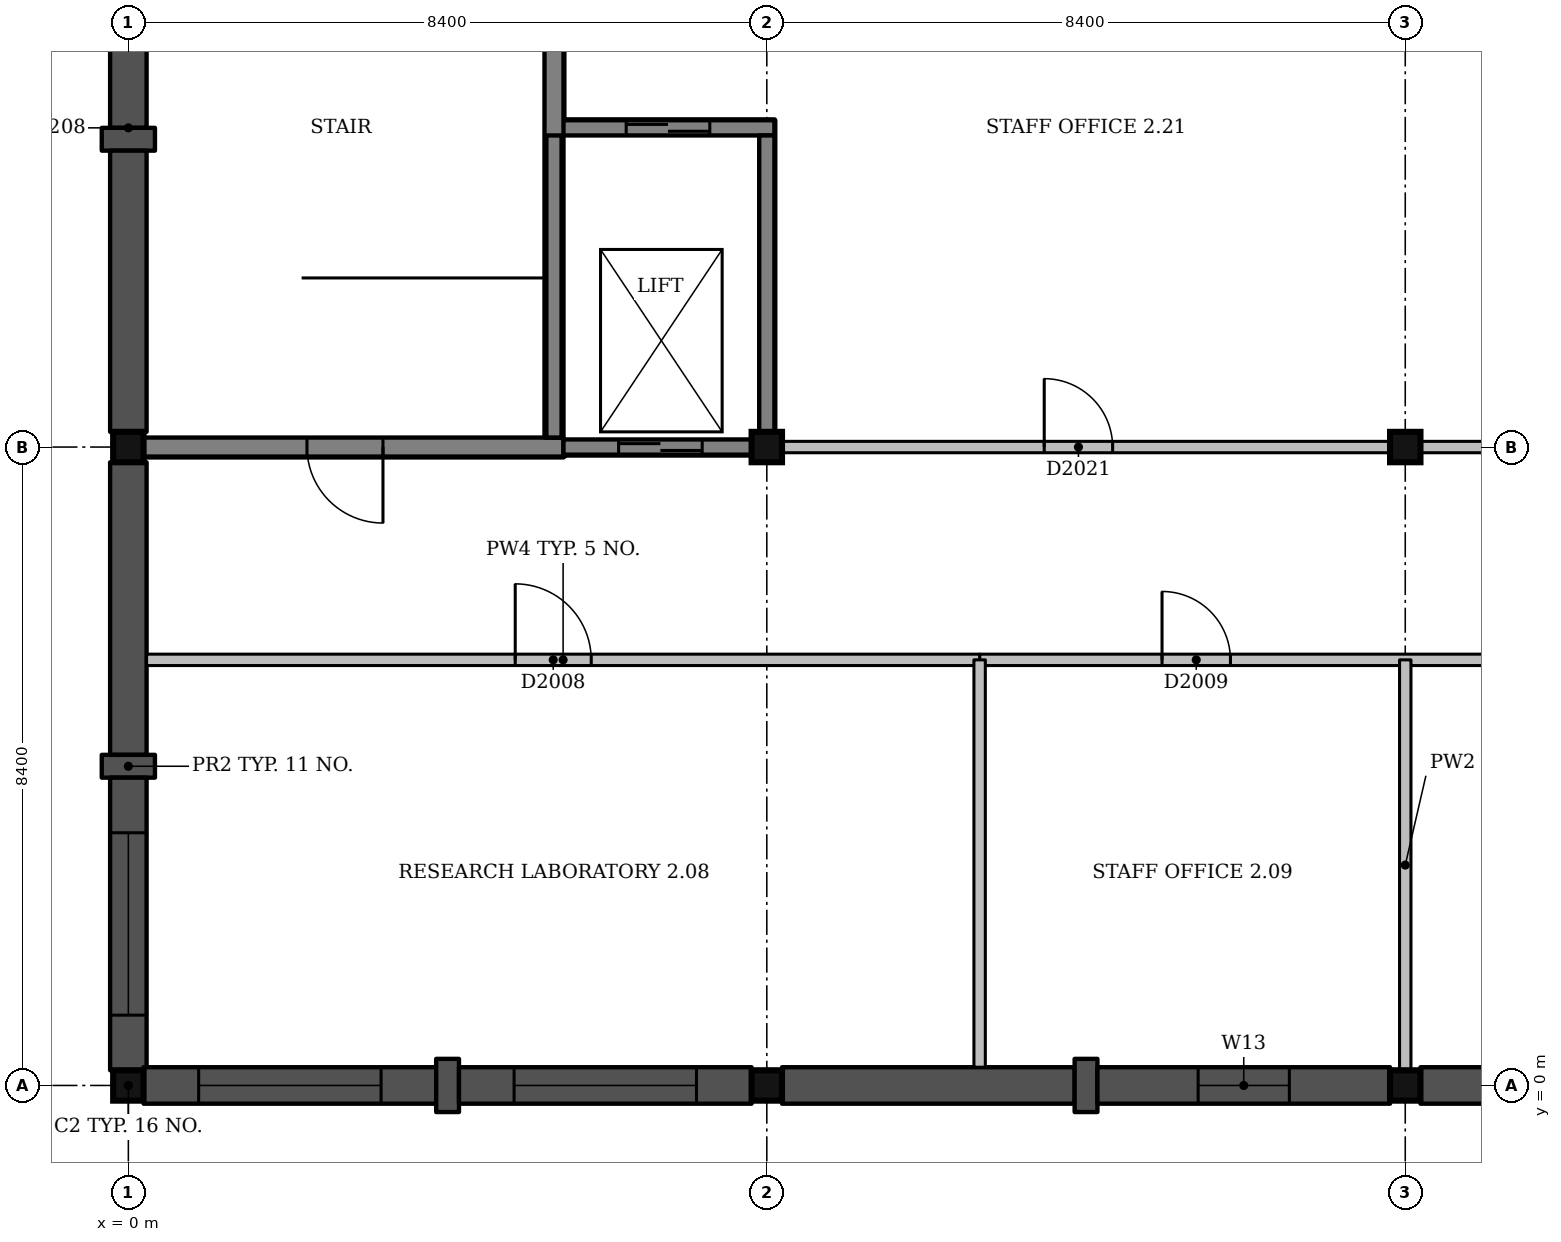
"""IFC4 building model, lengths in metres.
Left out: names, types, materials, properties, quantities, classifications, styles, units other than length and angle.
Written with IfcOpenShell. Run it as: python <this file> out.ifc"""

import sys

from ifc_helpers import new_model, si_unit, direction, frame, frame_2d, origin, origin_2d, place, context, subcontext, project, spatial, rectangle, extrude, element, fill, save


model = new_model("IFC4")
c1 = context("Model", 3, precision=1e-05, world=origin(), true_north=direction((0.0, 1.0)))
c2 = subcontext(c1, "Body", "Model", "MODEL_VIEW")
j1 = project(units=[si_unit("LENGTHUNIT", "METRE"), si_unit("PLANEANGLEUNIT", "RADIAN")], contexts=[c1])
p1 = place(None, origin())
s1 = spatial("IfcSite", under=j1, at=p1, CompositionType="ELEMENT")
p2 = place(p1, origin())
s2 = spatial("IfcBuilding", under=s1, at=p2, CompositionType="ELEMENT")
p3 = place(p2, frame((0.0, 0.0, 9.0)))
s3 = spatial("IfcBuildingStorey", under=s2, at=p3, CompositionType="ELEMENT", Elevation=9.0)
for number, where, z_axis, x_axis in (
    (1, (0.0, 0.0, 0.0), (0.0, 0.0, 1.0), (1.0, 0.0, 0.0)),
    (2, (0.0, 8.4, 0.0), (0.0, 0.0, 1.0), (1.0, 0.0, 0.0)),
    (3, (8.4, 0.0, 0.0), (0.0, 0.0, 1.0), (1.0, 0.0, 0.0)),
    (4, (8.4, 8.4, 0.0), (0.0, 0.0, 1.0), (1.0, 0.0, 0.0)),
    (5, (16.8, 0.0, 0.0), (0.0, 0.0, 1.0), (1.0, 0.0, 0.0)),
    (6, (16.8, 8.4, 0.0), (0.0, 0.0, 1.0), (1.0, 0.0, 0.0)),
):
    element("IfcColumn", number, at=place(p3, frame(where, z_axis=z_axis, x_axis=x_axis)), inside=s3, PredefinedType="COLUMN", context=c2, shape_type="SweptSolid", body=[
        extrude(rectangle(XDim=0.4, YDim=0.4, at=origin_2d()), origin(), (0.0, 0.0, 1.0), 4.5),
    ])
p4 = place(p3, frame((5.5, 12.6, 0.0), z_axis=(0.0, 0.0, 1.0), x_axis=(1.0, 0.0, 0.0)))
e7 = element("IfcWall", 7, at=p4, inside=s3, PredefinedType="SHEAR", context=c2, shape_type="SweptSolid", body=[
    extrude(rectangle(XDim=3.0, YDim=0.2, at=frame_2d((1.5, 0.0))), origin(), (0.0, 0.0, 1.0), 4.5),
])
p5 = place(p4, frame((1.05, 0.0, 0.0)))
e8 = element("IfcOpeningElement", 8, at=p5, cuts=e7, PredefinedType="OPENING", context=c2, shape_type="SweptSolid", body=[
    extrude(rectangle(XDim=1.1, YDim=2.1, at=frame_2d((0.55, 1.05))), frame((0.0, 0.11, 0.0), z_axis=(0.0, -1.0, 0.0), x_axis=(1.0, 0.0, 0.0)), (0.0, 0.0, 1.0), 0.22),
])
p6 = place(p3, frame((8.4, 8.6, 0.0), z_axis=(0.0, 0.0, 1.0), x_axis=(0.0, 1.0, 0.0)))
e9 = element("IfcWall", 9, at=p6, inside=s3, PredefinedType="SHEAR", context=c2, shape_type="SweptSolid", body=[
    extrude(rectangle(XDim=3.9, YDim=0.2, at=frame_2d((1.95, 0.0))), origin(), (0.0, 0.0, 1.0), 4.5),
])
p7 = place(p3, frame((0.2, 8.4, 0.0), z_axis=(0.0, 0.0, 1.0), x_axis=(1.0, 0.0, 0.0)))
e10 = element("IfcWall", 10, at=p7, inside=s3, PredefinedType="SHEAR", context=c2, shape_type="SweptSolid", body=[
    extrude(rectangle(XDim=5.525, YDim=0.25, at=frame_2d((2.763, 0.0))), origin(), (0.0, 0.0, 1.0), 4.2),
])
p8 = place(p7, frame((2.15, 0.0, 0.0)))
e11 = element("IfcOpeningElement", 11, at=p8, cuts=e10, PredefinedType="OPENING", context=c2, shape_type="SweptSolid", body=[
    extrude(rectangle(XDim=1.0, YDim=2.1, at=frame_2d((0.5, 1.05))), frame((0.0, 0.135, 0.0), z_axis=(0.0, -1.0, 0.0), x_axis=(1.0, 0.0, 0.0)), (0.0, 0.0, 1.0), 0.27),
])
p9 = place(p3, frame((5.6, 8.525, 0.0), z_axis=(0.0, 0.0, 1.0), x_axis=(0.0, 1.0, 0.0)))
e12 = element("IfcWall", 12, at=p9, inside=s3, PredefinedType="SHEAR", context=c2, shape_type="SweptSolid", body=[
    extrude(rectangle(XDim=8.15, YDim=0.25, at=frame_2d((4.075, 0.0))), origin(), (0.0, 0.0, 1.0), 4.2),
])
p10 = place(p3, frame((0.0, 16.3, 0.0), z_axis=(0.0, 0.0, 1.0), x_axis=(0.0, -1.0, 0.0)))
e13 = element("IfcWall", 13, at=p10, inside=s3, PredefinedType="SOLIDWALL", context=c2, shape_type="SweptSolid", body=[
    extrude(rectangle(XDim=3.7, YDim=0.48, at=frame_2d((1.85, 0.0))), origin(), (0.0, 0.0, 1.0), 4.2),
])
p11 = place(p3, frame((0.0, 12.6, 0.0), z_axis=(0.0, 0.0, 1.0), x_axis=(0.0, -1.0, 0.0)))
e14 = element("IfcWall", 14, at=p11, inside=s3, PredefinedType="SOLIDWALL", context=c2, shape_type="SweptSolid", body=[
    extrude(rectangle(XDim=0.3, YDim=0.7, at=frame_2d((0.15, 0.0))), origin(), (0.0, 0.0, 1.0), 4.2),
])
p12 = place(p3, frame((0.0, 12.3, 0.0), z_axis=(0.0, 0.0, 1.0), x_axis=(0.0, -1.0, 0.0)))
e15 = element("IfcWall", 15, at=p12, inside=s3, PredefinedType="SOLIDWALL", context=c2, shape_type="SweptSolid", body=[
    extrude(rectangle(XDim=3.7, YDim=0.48, at=frame_2d((1.85, 0.0))), origin(), (0.0, 0.0, 1.0), 4.2),
])
p13 = place(p3, frame((0.0, 8.2, 0.0), z_axis=(0.0, 0.0, 1.0), x_axis=(0.0, -1.0, 0.0)))
e16 = element("IfcWall", 16, at=p13, inside=s3, PredefinedType="SOLIDWALL", context=c2, shape_type="SweptSolid", body=[
    extrude(rectangle(XDim=3.85, YDim=0.48, at=frame_2d((1.925, 0.0))), origin(), (0.0, 0.0, 1.0), 3.6),
])
p14 = place(p3, frame((0.0, 4.35, 0.0), z_axis=(0.0, 0.0, 1.0), x_axis=(0.0, -1.0, 0.0)))
e17 = element("IfcWall", 17, at=p14, inside=s3, PredefinedType="SOLIDWALL", context=c2, shape_type="SweptSolid", body=[
    extrude(rectangle(XDim=0.3, YDim=0.7, at=frame_2d((0.15, 0.0))), origin(), (0.0, 0.0, 1.0), 3.6),
])
p15 = place(p3, frame((0.0, 4.05, 0.0), z_axis=(0.0, 0.0, 1.0), x_axis=(0.0, -1.0, 0.0)))
e18 = element("IfcWall", 18, at=p15, inside=s3, PredefinedType="SOLIDWALL", context=c2, shape_type="SweptSolid", body=[
    extrude(rectangle(XDim=3.85, YDim=0.48, at=frame_2d((1.925, 0.0))), origin(), (0.0, 0.0, 1.0), 3.6),
])
p16 = place(p15, frame((0.725, 0.0, 2.4)))
e19 = element("IfcOpeningElement", 19, at=p16, cuts=e18, PredefinedType="OPENING", context=c2, shape_type="SweptSolid", body=[
    extrude(rectangle(XDim=2.4, YDim=0.6, at=frame_2d((1.2, 0.3))), frame((0.0, 0.25, 0.0), z_axis=(0.0, -1.0, 0.0), x_axis=(1.0, 0.0, 0.0)), (0.0, 0.0, 1.0), 0.5),
])
p17 = place(p3, frame((0.2, 0.0, 0.0), z_axis=(0.0, 0.0, 1.0), x_axis=(1.0, 0.0, 0.0)))
e20 = element("IfcWall", 20, at=p17, inside=s3, PredefinedType="SOLIDWALL", context=c2, shape_type="SweptSolid", body=[
    extrude(rectangle(XDim=3.85, YDim=0.48, at=frame_2d((1.925, 0.0))), origin(), (0.0, 0.0, 1.0), 3.6),
])
p18 = place(p17, frame((0.725, 0.0, 2.4)))
e21 = element("IfcOpeningElement", 21, at=p18, cuts=e20, PredefinedType="OPENING", context=c2, shape_type="SweptSolid", body=[
    extrude(rectangle(XDim=2.4, YDim=0.6, at=frame_2d((1.2, 0.3))), frame((0.0, 0.25, 0.0), z_axis=(0.0, -1.0, 0.0), x_axis=(1.0, 0.0, 0.0)), (0.0, 0.0, 1.0), 0.5),
])
p19 = place(p3, frame((4.05, 0.0, 0.0), z_axis=(0.0, 0.0, 1.0), x_axis=(1.0, 0.0, 0.0)))
e22 = element("IfcWall", 22, at=p19, inside=s3, PredefinedType="SOLIDWALL", context=c2, shape_type="SweptSolid", body=[
    extrude(rectangle(XDim=0.3, YDim=0.7, at=frame_2d((0.15, 0.0))), origin(), (0.0, 0.0, 1.0), 3.6),
])
p20 = place(p3, frame((4.35, 0.0, 0.0), z_axis=(0.0, 0.0, 1.0), x_axis=(1.0, 0.0, 0.0)))
e23 = element("IfcWall", 23, at=p20, inside=s3, PredefinedType="SOLIDWALL", context=c2, shape_type="SweptSolid", body=[
    extrude(rectangle(XDim=3.85, YDim=0.48, at=frame_2d((1.925, 0.0))), origin(), (0.0, 0.0, 1.0), 3.6),
])
p21 = place(p20, frame((0.725, 0.0, 2.4)))
e24 = element("IfcOpeningElement", 24, at=p21, cuts=e23, PredefinedType="OPENING", context=c2, shape_type="SweptSolid", body=[
    extrude(rectangle(XDim=2.4, YDim=0.6, at=frame_2d((1.2, 0.3))), frame((0.0, 0.25, 0.0), z_axis=(0.0, -1.0, 0.0), x_axis=(1.0, 0.0, 0.0)), (0.0, 0.0, 1.0), 0.5),
])
p22 = place(p3, frame((8.6, 0.0, 0.0), z_axis=(0.0, 0.0, 1.0), x_axis=(1.0, 0.0, 0.0)))
e25 = element("IfcWall", 25, at=p22, inside=s3, PredefinedType="SOLIDWALL", context=c2, shape_type="SweptSolid", body=[
    extrude(rectangle(XDim=3.85, YDim=0.48, at=frame_2d((1.925, 0.0))), origin(), (0.0, 0.0, 1.0), 3.6),
])
p23 = place(p3, frame((12.45, 0.0, 0.0), z_axis=(0.0, 0.0, 1.0), x_axis=(1.0, 0.0, 0.0)))
e26 = element("IfcWall", 26, at=p23, inside=s3, PredefinedType="SOLIDWALL", context=c2, shape_type="SweptSolid", body=[
    extrude(rectangle(XDim=0.3, YDim=0.7, at=frame_2d((0.15, 0.0))), origin(), (0.0, 0.0, 1.0), 3.6),
])
p24 = place(p3, frame((12.75, 0.0, 0.0), z_axis=(0.0, 0.0, 1.0), x_axis=(1.0, 0.0, 0.0)))
e27 = element("IfcWall", 27, at=p24, inside=s3, PredefinedType="SOLIDWALL", context=c2, shape_type="SweptSolid", body=[
    extrude(rectangle(XDim=3.85, YDim=0.48, at=frame_2d((1.925, 0.0))), origin(), (0.0, 0.0, 1.0), 3.6),
])
p25 = place(p24, frame((1.325, 0.0, 0.9)))
e28 = element("IfcOpeningElement", 28, at=p25, cuts=e27, PredefinedType="OPENING", context=c2, shape_type="SweptSolid", body=[
    extrude(rectangle(XDim=1.2, YDim=2.1, at=frame_2d((0.6, 1.05))), frame((0.0, 0.25, 0.0), z_axis=(0.0, -1.0, 0.0), x_axis=(1.0, 0.0, 0.0)), (0.0, 0.0, 1.0), 0.5),
])
p26 = place(p3, frame((17.0, 0.0, 0.0), z_axis=(0.0, 0.0, 1.0), x_axis=(1.0, 0.0, 0.0)))
e29 = element("IfcWall", 29, at=p26, inside=s3, PredefinedType="SOLIDWALL", context=c2, shape_type="SweptSolid", body=[
    extrude(rectangle(XDim=3.85, YDim=0.48, at=frame_2d((1.925, 0.0))), origin(), (0.0, 0.0, 1.0), 3.6),
])
p27 = place(p26, frame((1.325, 0.0, 0.9)))
e30 = element("IfcOpeningElement", 30, at=p27, cuts=e29, PredefinedType="OPENING", context=c2, shape_type="SweptSolid", body=[
    extrude(rectangle(XDim=1.2, YDim=2.1, at=frame_2d((0.6, 1.05))), frame((0.0, 0.25, 0.0), z_axis=(0.0, -1.0, 0.0), x_axis=(1.0, 0.0, 0.0)), (0.0, 0.0, 1.0), 0.5),
])
p28 = place(p3, frame((11.2, 5.6, 0.0), z_axis=(0.0, 0.0, 1.0), x_axis=(1.0, 0.0, 0.0)))
e31 = element("IfcWall", 31, at=p28, inside=s3, PredefinedType="PARTITIONING", context=c2, shape_type="SweptSolid", body=[
    extrude(rectangle(XDim=30.0, YDim=0.15, at=frame_2d((15.0, 0.0))), origin(), (0.0, 0.0, 1.0), 3.6),
])
p29 = place(p28, frame((2.4, 0.0, 0.0)))
e32 = element("IfcOpeningElement", 32, at=p29, cuts=e31, PredefinedType="OPENING", context=c2, shape_type="SweptSolid", body=[
    extrude(rectangle(XDim=0.9, YDim=2.1, at=frame_2d((0.45, 1.05))), frame((0.0, 0.085, 0.0), z_axis=(0.0, -1.0, 0.0), x_axis=(1.0, 0.0, 0.0)), (0.0, 0.0, 1.0), 0.17),
])
p30 = place(p28, frame((8.0, 0.0, 0.0)))
e33 = element("IfcOpeningElement", 33, at=p30, cuts=e31, PredefinedType="OPENING", context=c2, shape_type="SweptSolid", body=[
    extrude(rectangle(XDim=0.9, YDim=2.1, at=frame_2d((0.45, 1.05))), frame((0.0, 0.085, 0.0), z_axis=(0.0, -1.0, 0.0), x_axis=(1.0, 0.0, 0.0)), (0.0, 0.0, 1.0), 0.17),
])
p31 = place(p28, frame((16.4, 0.0, 0.0)))
e34 = element("IfcOpeningElement", 34, at=p31, cuts=e31, PredefinedType="OPENING", context=c2, shape_type="SweptSolid", body=[
    extrude(rectangle(XDim=0.9, YDim=2.1, at=frame_2d((0.45, 1.05))), frame((0.0, 0.085, 0.0), z_axis=(0.0, -1.0, 0.0), x_axis=(1.0, 0.0, 0.0)), (0.0, 0.0, 1.0), 0.17),
])
p32 = place(p3, frame((0.24, 5.6, 0.0), z_axis=(0.0, 0.0, 1.0), x_axis=(1.0, 0.0, 0.0)))
e35 = element("IfcWall", 35, at=p32, inside=s3, PredefinedType="PARTITIONING", context=c2, shape_type="SweptSolid", body=[
    extrude(rectangle(XDim=10.96, YDim=0.15, at=frame_2d((5.48, 0.0))), origin(), (0.0, 0.0, 1.0), 3.6),
])
p33 = place(p32, frame((4.85, 0.0, 0.0)))
e36 = element("IfcOpeningElement", 36, at=p33, cuts=e35, PredefinedType="OPENING", context=c2, shape_type="SweptSolid", body=[
    extrude(rectangle(XDim=1.0, YDim=2.1, at=frame_2d((0.5, 1.05))), frame((0.0, 0.085, 0.0), z_axis=(0.0, -1.0, 0.0), x_axis=(1.0, 0.0, 0.0)), (0.0, 0.0, 1.0), 0.17),
])
p34 = place(p3, frame((8.6, 8.4, 0.0), z_axis=(0.0, 0.0, 1.0), x_axis=(1.0, 0.0, 0.0)))
e37 = element("IfcWall", 37, at=p34, inside=s3, PredefinedType="PARTITIONING", context=c2, shape_type="SweptSolid", body=[
    extrude(rectangle(XDim=8.0, YDim=0.15, at=frame_2d((4.0, 0.0))), origin(), (0.0, 0.0, 1.0), 3.6),
])
p35 = place(p34, frame((3.45, 0.0, 0.0)))
e38 = element("IfcOpeningElement", 38, at=p35, cuts=e37, PredefinedType="OPENING", context=c2, shape_type="SweptSolid", body=[
    extrude(rectangle(XDim=0.9, YDim=2.1, at=frame_2d((0.45, 1.05))), frame((0.0, 0.085, 0.0), z_axis=(0.0, -1.0, 0.0), x_axis=(1.0, 0.0, 0.0)), (0.0, 0.0, 1.0), 0.17),
])
p36 = place(p3, frame((17.0, 8.4, 0.0), z_axis=(0.0, 0.0, 1.0), x_axis=(1.0, 0.0, 0.0)))
e39 = element("IfcWall", 39, at=p36, inside=s3, PredefinedType="PARTITIONING", context=c2, shape_type="SweptSolid", body=[
    extrude(rectangle(XDim=2.6, YDim=0.15, at=frame_2d((1.3, 0.0))), origin(), (0.0, 0.0, 1.0), 3.6),
])
p37 = place(p3, frame((11.2, 0.24, 0.0), z_axis=(0.0, 0.0, 1.0), x_axis=(0.0, 1.0, 0.0)))
e40 = element("IfcWall", 40, at=p37, inside=s3, PredefinedType="PARTITIONING", context=c2, shape_type="SweptSolid", body=[
    extrude(rectangle(XDim=5.36, YDim=0.15, at=frame_2d((2.68, 0.0))), origin(), (0.0, 0.0, 1.0), 4.15),
])
p38 = place(p3, frame((16.8, 0.2, 0.0), z_axis=(0.0, 0.0, 1.0), x_axis=(0.0, 1.0, 0.0)))
e41 = element("IfcWall", 41, at=p38, inside=s3, PredefinedType="PARTITIONING", context=c2, shape_type="SweptSolid", body=[
    extrude(rectangle(XDim=5.4, YDim=0.15, at=frame_2d((2.7, 0.0))), origin(), (0.0, 0.0, 1.0), 3.6),
])
p39 = place(p3, frame((5.725, 8.4, 0.0), z_axis=(0.0, 0.0, 1.0), x_axis=(1.0, 0.0, 0.0)))
e42 = element("IfcWall", 42, at=p39, inside=s3, PredefinedType="SHEAR", context=c2, shape_type="SweptSolid", body=[
    extrude(rectangle(XDim=2.475, YDim=0.2, at=frame_2d((1.237, 0.0))), origin(), (0.0, 0.0, 1.0), 4.5),
])
p40 = place(p39, frame((0.725, 0.0, 0.0)))
e43 = element("IfcOpeningElement", 43, at=p40, cuts=e42, PredefinedType="OPENING", context=c2, shape_type="SweptSolid", body=[
    extrude(rectangle(XDim=1.1, YDim=2.1, at=frame_2d((0.55, 1.05))), frame((0.0, 0.11, 0.0), z_axis=(0.0, -1.0, 0.0), x_axis=(1.0, 0.0, 0.0)), (0.0, 0.0, 1.0), 0.22),
])
p41 = place(p3, frame((5.6, 8.525, 4.2), z_axis=(0.0, 0.0, 1.0), x_axis=(0.0, 1.0, 0.0)))
e44 = element("IfcWall", 44, at=p41, inside=s3, PredefinedType="SHEAR", context=c2, shape_type="SweptSolid", body=[
    extrude(rectangle(XDim=3.975, YDim=0.2, at=frame_2d((1.988, 0.0))), origin(), (0.0, 0.0, 1.0), 0.3),
])
p42 = place(p16, origin())
e45 = element("IfcWindow", 45, at=p42, inside=s3, PartitioningType="SINGLE_PANEL", PredefinedType="WINDOW", context=c2, shape_type="SweptSolid", body=[
    extrude(rectangle(XDim=2.4, YDim=0.6, at=frame_2d((1.2, 0.3))), frame((0.0, 0.12, 0.0), z_axis=(0.0, -1.0, 0.0), x_axis=(1.0, 0.0, 0.0)), (0.0, 0.0, 1.0), 0.06),
])
fill(e19, e45)
p43 = place(p18, origin())
e46 = element("IfcWindow", 46, at=p43, inside=s3, PartitioningType="SINGLE_PANEL", PredefinedType="WINDOW", context=c2, shape_type="SweptSolid", body=[
    extrude(rectangle(XDim=2.4, YDim=0.6, at=frame_2d((1.2, 0.3))), frame((0.0, 0.12, 0.0), z_axis=(0.0, -1.0, 0.0), x_axis=(1.0, 0.0, 0.0)), (0.0, 0.0, 1.0), 0.06),
])
fill(e21, e46)
p44 = place(p21, origin())
e47 = element("IfcWindow", 47, at=p44, inside=s3, PartitioningType="SINGLE_PANEL", PredefinedType="WINDOW", context=c2, shape_type="SweptSolid", body=[
    extrude(rectangle(XDim=2.4, YDim=0.6, at=frame_2d((1.2, 0.3))), frame((0.0, 0.12, 0.0), z_axis=(0.0, -1.0, 0.0), x_axis=(1.0, 0.0, 0.0)), (0.0, 0.0, 1.0), 0.06),
])
fill(e24, e47)
p45 = place(p25, origin())
e48 = element("IfcWindow", 48, at=p45, inside=s3, PartitioningType="SINGLE_PANEL", PredefinedType="WINDOW", context=c2, shape_type="SweptSolid", body=[
    extrude(rectangle(XDim=1.2, YDim=2.1, at=frame_2d((0.6, 1.05))), frame((0.0, 0.12, 0.0), z_axis=(0.0, -1.0, 0.0), x_axis=(1.0, 0.0, 0.0)), (0.0, 0.0, 1.0), 0.06),
])
fill(e28, e48)
p46 = place(p33, origin())
e49 = element("IfcDoor", 49, at=p46, inside=s3, OperationType="SINGLE_SWING_LEFT", PredefinedType="DOOR", context=c2, shape_type="SweptSolid", body=[
    extrude(rectangle(XDim=1.0, YDim=2.1, at=frame_2d((0.5, 1.05))), frame((0.0, 0.025, 0.0), z_axis=(0.0, -1.0, 0.0), x_axis=(1.0, 0.0, 0.0)), (0.0, 0.0, 1.0), 0.05),
])
fill(e36, e49)
p47 = place(p29, origin())
e50 = element("IfcDoor", 50, at=p47, inside=s3, OperationType="SINGLE_SWING_LEFT", PredefinedType="DOOR", context=c2, shape_type="SweptSolid", body=[
    extrude(rectangle(XDim=0.9, YDim=2.1, at=frame_2d((0.45, 1.05))), frame((0.0, 0.025, 0.0), z_axis=(0.0, -1.0, 0.0), x_axis=(1.0, 0.0, 0.0)), (0.0, 0.0, 1.0), 0.05),
])
fill(e32, e50)
p48 = place(p35, origin())
e51 = element("IfcDoor", 51, at=p48, inside=s3, OperationType="SINGLE_SWING_LEFT", PredefinedType="DOOR", context=c2, shape_type="SweptSolid", body=[
    extrude(rectangle(XDim=0.9, YDim=2.1, at=frame_2d((0.45, 1.05))), frame((0.0, 0.025, 0.0), z_axis=(0.0, -1.0, 0.0), x_axis=(1.0, 0.0, 0.0)), (0.0, 0.0, 1.0), 0.05),
])
fill(e38, e51)
p49 = place(p8, origin())
e52 = element("IfcDoor", 52, at=p49, inside=s3, OperationType="SINGLE_SWING_RIGHT", PredefinedType="DOOR", context=c2, shape_type="SweptSolid", body=[
    extrude(rectangle(XDim=1.0, YDim=2.1, at=frame_2d((0.5, 1.05))), frame((0.0, 0.025, 0.0), z_axis=(0.0, -1.0, 0.0), x_axis=(1.0, 0.0, 0.0)), (0.0, 0.0, 1.0), 0.05),
])
fill(e11, e52)
p50 = place(p40, origin())
e53 = element("IfcDoor", 53, at=p50, inside=s3, OperationType="SLIDING_TO_RIGHT", PredefinedType="DOOR", context=c2, shape_type="SweptSolid", body=[
    extrude(rectangle(XDim=1.1, YDim=2.1, at=frame_2d((0.55, 1.05))), frame((0.0, 0.025, 0.0), z_axis=(0.0, -1.0, 0.0), x_axis=(1.0, 0.0, 0.0)), (0.0, 0.0, 1.0), 0.05),
])
fill(e43, e53)
p51 = place(p5, origin())
e54 = element("IfcDoor", 54, at=p51, inside=s3, OperationType="SLIDING_TO_LEFT", PredefinedType="DOOR", context=c2, shape_type="SweptSolid", body=[
    extrude(rectangle(XDim=1.1, YDim=2.1, at=frame_2d((0.55, 1.05))), frame((0.0, 0.025, 0.0), z_axis=(0.0, -1.0, 0.0), x_axis=(1.0, 0.0, 0.0)), (0.0, 0.0, 1.0), 0.05),
])
fill(e8, e54)
save(model, sys.argv[1])
